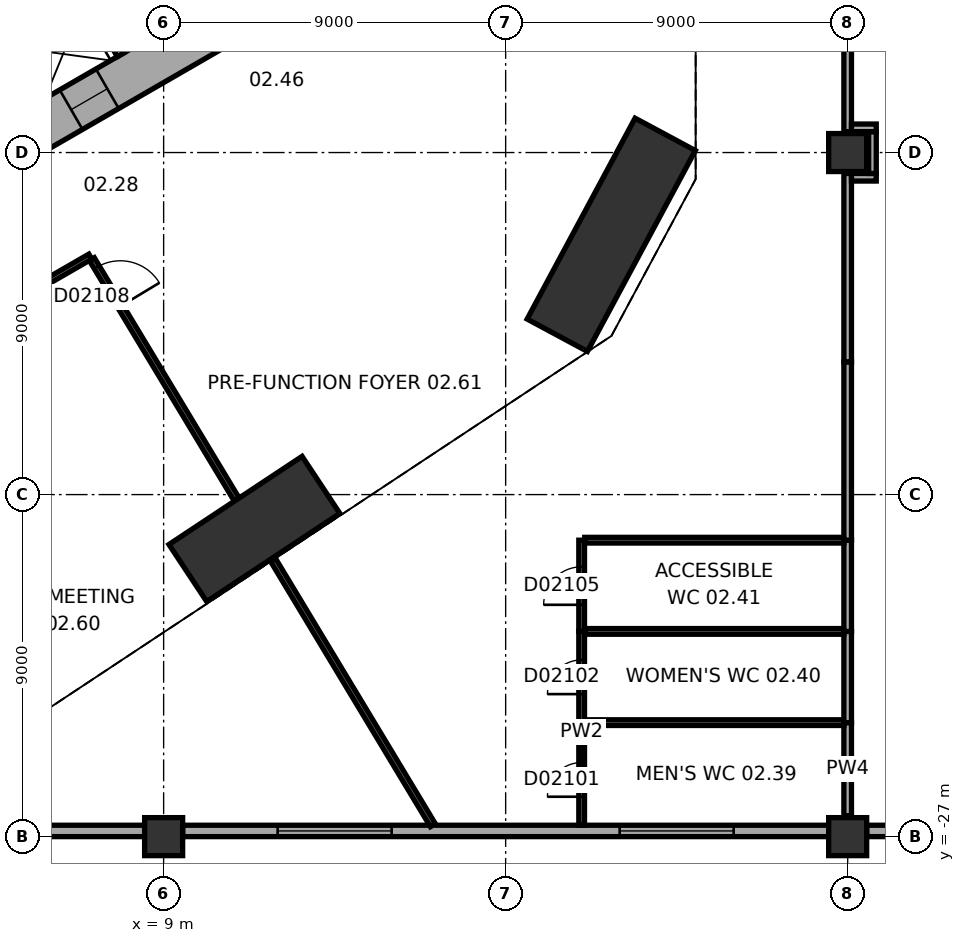
"""IFC4 building model, lengths in metres.
Left out: names, types, materials, properties, quantities, classifications, styles, units other than length and angle.
Written with IfcOpenShell. Run it as: python <this file> out.ifc"""

import sys

from ifc_helpers import new_model, si_unit, direction, frame, frame_2d, origin, origin_2d, place, context, subcontext, project, spatial, rectangle, extrude, element, fill, save


model = new_model("IFC4")
c1 = context("Model", 3, precision=1e-05, world=origin(), true_north=direction((0.0, 1.0)))
c2 = subcontext(c1, "Body", "Model", "MODEL_VIEW")
j1 = project(units=[si_unit("LENGTHUNIT", "METRE"), si_unit("PLANEANGLEUNIT", "RADIAN")], contexts=[c1])
p1 = place(None, origin())
s1 = spatial("IfcSite", under=j1, at=p1, CompositionType="ELEMENT")
p2 = place(p1, origin())
s2 = spatial("IfcBuilding", under=s1, at=p2, CompositionType="ELEMENT")
p3 = place(p2, frame((0.0, 0.0, 13.0)))
s3 = spatial("IfcBuildingStorey", under=s2, at=p3, CompositionType="ELEMENT", Elevation=13.0)
p4 = place(p3, frame((11.389, -18.905, 0.0), z_axis=(0.0, 0.0, 1.0), x_axis=(0.833880042151, 0.551945717714, 0.0)))
e1 = element("IfcColumn", 1, at=p4, inside=s3, PredefinedType="COLUMN", context=c2, shape_type="SweptSolid", body=[
    extrude(rectangle(XDim=4.2, YDim=1.8, at=origin_2d()), origin(), (0.0, 0.0, 1.0), 8.0),
])
p5 = place(p3, frame((20.779, -11.165, 0.0), z_axis=(0.0, 0.0, 1.0), x_axis=(0.473322742071, 0.880889086003, 0.0)))
e2 = element("IfcColumn", 2, at=p5, inside=s3, PredefinedType="COLUMN", context=c2, shape_type="SweptSolid", body=[
    extrude(rectangle(XDim=6.0, YDim=1.8, at=origin_2d()), origin(), (0.0, 0.0, 1.0), 8.0),
])
for number, where, z_axis, x_axis in (
    (3, (9.0, -27.0, 0.0), (0.0, 0.0, 1.0), (1.0, 0.0, 0.0)),
    (4, (27.0, -27.0, 0.0), (0.0, 0.0, 1.0), (1.0, 0.0, 0.0)),
    (5, (27.0, -9.0, 0.0), (0.0, 0.0, 1.0), (1.0, 0.0, 0.0)),
):
    element("IfcColumn", number, at=place(p3, frame(where, z_axis=z_axis, x_axis=x_axis)), inside=s3, PredefinedType="COLUMN", context=c2, shape_type="SweptSolid", body=[
        extrude(rectangle(XDim=1.0, YDim=1.0, at=origin_2d()), origin(), (0.0, 0.0, 1.0), 8.0),
    ])
p6 = place(p3, frame((-0.3, -11.836, 0.0), z_axis=(0.0, 0.0, 1.0), x_axis=(0.866021384402, 0.500006961711, 0.0)))
e6 = element("IfcWall", 6, at=p6, inside=s3, PredefinedType="SHEAR", context=c2, shape_type="SweptSolid", body=[
    extrude(rectangle(XDim=12.355, YDim=1.2, at=frame_2d((6.178, 0.0))), origin(), (0.0, 0.0, 1.0), 8.0),
])
p7 = place(p6, frame((4.128, 0.0, 0.0)))
e7 = element("IfcOpeningElement", 7, at=p7, cuts=e6, PredefinedType="OPENING", context=c2, shape_type="SweptSolid", body=[
    extrude(rectangle(XDim=0.9, YDim=2.1, at=frame_2d((0.45, 1.05))), frame((0.0, 0.61, 0.0), z_axis=(0.0, -1.0, 0.0), x_axis=(1.0, 0.0, 0.0)), (0.0, 0.0, 1.0), 1.22),
])
p8 = place(p6, frame((7.928, 0.0, 0.0)))
e8 = element("IfcOpeningElement", 8, at=p8, cuts=e6, PredefinedType="OPENING", context=c2, shape_type="SweptSolid", body=[
    extrude(rectangle(XDim=1.1, YDim=2.1, at=frame_2d((0.55, 1.05))), frame((0.0, 0.61, 0.0), z_axis=(0.0, -1.0, 0.0), x_axis=(1.0, 0.0, 0.0)), (0.0, 0.0, 1.0), 1.22),
])
p9 = place(p3, frame((-8.5, -26.85, 0.0), z_axis=(0.0, 0.0, 1.0), x_axis=(1.0, 0.0, 0.0)))
e9 = element("IfcWall", 9, at=p9, inside=s3, PredefinedType="STANDARD", context=c2, shape_type="SweptSolid", body=[
    extrude(rectangle(XDim=17.0, YDim=0.3, at=frame_2d((8.5, 0.0))), origin(), (0.0, 0.0, 1.0), 6.5),
])
p10 = place(p9, frame((2.5, 0.0, 1.0)))
e10 = element("IfcOpeningElement", 10, at=p10, cuts=e9, PredefinedType="OPENING", context=c2, shape_type="SweptSolid", body=[
    extrude(rectangle(XDim=3.0, YDim=4.0, at=frame_2d((1.5, 2.0))), frame((0.0, 0.16, 0.0), z_axis=(0.0, -1.0, 0.0), x_axis=(1.0, 0.0, 0.0)), (0.0, 0.0, 1.0), 0.32),
])
p11 = place(p9, frame((11.5, 0.0, 1.0)))
e11 = element("IfcOpeningElement", 11, at=p11, cuts=e9, PredefinedType="OPENING", context=c2, shape_type="SweptSolid", body=[
    extrude(rectangle(XDim=3.0, YDim=4.0, at=frame_2d((1.5, 2.0))), frame((0.0, 0.16, 0.0), z_axis=(0.0, -1.0, 0.0), x_axis=(1.0, 0.0, 0.0)), (0.0, 0.0, 1.0), 0.32),
])
p12 = place(p3, frame((9.5, -26.85, 0.0), z_axis=(0.0, 0.0, 1.0), x_axis=(1.0, 0.0, 0.0)))
e12 = element("IfcWall", 12, at=p12, inside=s3, PredefinedType="STANDARD", context=c2, shape_type="SweptSolid", body=[
    extrude(rectangle(XDim=17.0, YDim=0.3, at=frame_2d((8.5, 0.0))), origin(), (0.0, 0.0, 1.0), 6.5),
])
p13 = place(p12, frame((2.5, 0.0, 1.0)))
e13 = element("IfcOpeningElement", 13, at=p13, cuts=e12, PredefinedType="OPENING", context=c2, shape_type="SweptSolid", body=[
    extrude(rectangle(XDim=3.0, YDim=4.0, at=frame_2d((1.5, 2.0))), frame((0.0, 0.16, 0.0), z_axis=(0.0, -1.0, 0.0), x_axis=(1.0, 0.0, 0.0)), (0.0, 0.0, 1.0), 0.32),
])
p14 = place(p12, frame((11.5, 0.0, 1.0)))
e14 = element("IfcOpeningElement", 14, at=p14, cuts=e12, PredefinedType="OPENING", context=c2, shape_type="SweptSolid", body=[
    extrude(rectangle(XDim=3.0, YDim=4.0, at=frame_2d((1.5, 2.0))), frame((0.0, 0.16, 0.0), z_axis=(0.0, -1.0, 0.0), x_axis=(1.0, 0.0, 0.0)), (0.0, 0.0, 1.0), 0.32),
])
p15 = place(p3, frame((27.5, -26.85, 0.0), z_axis=(0.0, 0.0, 1.0), x_axis=(1.0, 0.0, 0.0)))
e15 = element("IfcWall", 15, at=p15, inside=s3, PredefinedType="STANDARD", context=c2, shape_type="SweptSolid", body=[
    extrude(rectangle(XDim=17.0, YDim=0.3, at=frame_2d((8.5, 0.0))), origin(), (0.0, 0.0, 1.0), 6.5),
])
p16 = place(p15, frame((2.5, 0.0, 1.0)))
e16 = element("IfcOpeningElement", 16, at=p16, cuts=e15, PredefinedType="OPENING", context=c2, shape_type="SweptSolid", body=[
    extrude(rectangle(XDim=3.0, YDim=4.0, at=frame_2d((1.5, 2.0))), frame((0.0, 0.16, 0.0), z_axis=(0.0, -1.0, 0.0), x_axis=(1.0, 0.0, 0.0)), (0.0, 0.0, 1.0), 0.32),
])
p17 = place(p15, frame((11.5, 0.0, 1.0)))
e17 = element("IfcOpeningElement", 17, at=p17, cuts=e15, PredefinedType="OPENING", context=c2, shape_type="SweptSolid", body=[
    extrude(rectangle(XDim=3.0, YDim=4.0, at=frame_2d((1.5, 2.0))), frame((0.0, 0.16, 0.0), z_axis=(0.0, -1.0, 0.0), x_axis=(1.0, 0.0, 0.0)), (0.0, 0.0, 1.0), 0.32),
])
p18 = place(p3, frame((-0.024, -8.559, 0.0), z_axis=(0.0, 0.0, 1.0), x_axis=(0.866026010844, 0.49999894854, 0.0)))
e18 = element("IfcWall", 18, at=p18, inside=s3, PredefinedType="PARTITIONING", context=c2, shape_type="SweptSolid", body=[
    extrude(rectangle(XDim=8.0, YDim=0.2, at=frame_2d((4.0, 0.0))), origin(), (0.0, 0.0, 1.0), 7.7),
])
p19 = place(p3, frame((6.768, -4.522, 0.0), z_axis=(0.0, 0.0, 1.0), x_axis=(0.50002983664, -0.866008176907, 0.0)))
e19 = element("IfcWall", 19, at=p19, inside=s3, PredefinedType="PARTITIONING", context=c2, shape_type="SweptSolid", body=[
    extrude(rectangle(XDim=2.2, YDim=0.2, at=frame_2d((1.1, 0.0))), origin(), (0.0, 0.0, 1.0), 7.7),
])
p20 = place(p3, frame((0.847, -7.767, 0.0), z_axis=(0.0, 0.0, 1.0), x_axis=(0.866027801685, 0.499995846692, 0.0)))
e20 = element("IfcWall", 20, at=p20, inside=s3, PredefinedType="SHEAR", context=c2, shape_type="SweptSolid", body=[
    extrude(rectangle(XDim=7.06, YDim=0.3, at=frame_2d((3.53, 0.0))), origin(), (0.0, 0.0, 1.0), 7.7),
])
p21 = place(p3, frame((20.0, -26.7, 0.0), z_axis=(0.0, 0.0, 1.0), x_axis=(0.0, 1.0, 0.0)))
e21 = element("IfcWall", 21, at=p21, inside=s3, PredefinedType="PARTITIONING", context=c2, shape_type="SweptSolid", body=[
    extrude(rectangle(XDim=2.7, YDim=0.15, at=frame_2d((1.35, 0.0))), origin(), (0.0, 0.0, 1.0), 7.7),
])
p22 = place(p21, frame((0.75, 0.0, 0.0)))
e22 = element("IfcOpeningElement", 22, at=p22, cuts=e21, PredefinedType="OPENING", context=c2, shape_type="SweptSolid", body=[
    extrude(rectangle(XDim=0.9, YDim=2.1, at=frame_2d((0.45, 1.05))), frame((0.0, 0.085, 0.0), z_axis=(0.0, -1.0, 0.0), x_axis=(1.0, 0.0, 0.0)), (0.0, 0.0, 1.0), 0.17),
])
p23 = place(p3, frame((27.0, -26.45, 0.0), z_axis=(0.0, 0.0, 1.0), x_axis=(0.0, 1.0, 0.0)))
e23 = element("IfcWall", 23, at=p23, inside=s3, PredefinedType="PARTITIONING", context=c2, shape_type="SweptSolid", body=[
    extrude(rectangle(XDim=2.45, YDim=0.2, at=frame_2d((1.225, 0.0))), origin(), (0.0, 0.0, 1.0), 6.5),
])
p24 = place(p3, frame((20.0, -24.0, 0.0), z_axis=(0.0, 0.0, 1.0), x_axis=(0.0, 1.0, 0.0)))
e24 = element("IfcWall", 24, at=p24, inside=s3, PredefinedType="PARTITIONING", context=c2, shape_type="SweptSolid", body=[
    extrude(rectangle(XDim=2.4, YDim=0.15, at=frame_2d((1.2, 0.0))), origin(), (0.0, 0.0, 1.0), 7.7),
])
p25 = place(p24, frame((0.75, 0.0, 0.0)))
e25 = element("IfcOpeningElement", 25, at=p25, cuts=e24, PredefinedType="OPENING", context=c2, shape_type="SweptSolid", body=[
    extrude(rectangle(XDim=0.9, YDim=2.1, at=frame_2d((0.45, 1.05))), frame((0.0, 0.085, 0.0), z_axis=(0.0, -1.0, 0.0), x_axis=(1.0, 0.0, 0.0)), (0.0, 0.0, 1.0), 0.17),
])
p26 = place(p3, frame((20.08, -24.0, 0.0), z_axis=(0.0, 0.0, 1.0), x_axis=(1.0, 0.0, 0.0)))
e26 = element("IfcWall", 26, at=p26, inside=s3, PredefinedType="PARTITIONING", context=c2, shape_type="SweptSolid", body=[
    extrude(rectangle(XDim=6.82, YDim=0.15, at=frame_2d((3.41, 0.0))), origin(), (0.0, 0.0, 1.0), 7.7),
])
p27 = place(p3, frame((27.0, -24.0, 0.0), z_axis=(0.0, 0.0, 1.0), x_axis=(0.0, 1.0, 0.0)))
e27 = element("IfcWall", 27, at=p27, inside=s3, PredefinedType="PARTITIONING", context=c2, shape_type="SweptSolid", body=[
    extrude(rectangle(XDim=2.4, YDim=0.2, at=frame_2d((1.2, 0.0))), origin(), (0.0, 0.0, 1.0), 6.5),
])
p28 = place(p3, frame((20.0, -21.6, 0.0), z_axis=(0.0, 0.0, 1.0), x_axis=(0.0, 1.0, 0.0)))
e28 = element("IfcWall", 28, at=p28, inside=s3, PredefinedType="PARTITIONING", context=c2, shape_type="SweptSolid", body=[
    extrude(rectangle(XDim=2.4, YDim=0.15, at=frame_2d((1.2, 0.0))), origin(), (0.0, 0.0, 1.0), 7.7),
])
p29 = place(p28, frame((0.7, 0.0, 0.0)))
e29 = element("IfcOpeningElement", 29, at=p29, cuts=e28, PredefinedType="OPENING", context=c2, shape_type="SweptSolid", body=[
    extrude(rectangle(XDim=1.0, YDim=2.1, at=frame_2d((0.5, 1.05))), frame((0.0, 0.085, 0.0), z_axis=(0.0, -1.0, 0.0), x_axis=(1.0, 0.0, 0.0)), (0.0, 0.0, 1.0), 0.17),
])
p30 = place(p3, frame((20.08, -21.6, 0.0), z_axis=(0.0, 0.0, 1.0), x_axis=(1.0, 0.0, 0.0)))
e30 = element("IfcWall", 30, at=p30, inside=s3, PredefinedType="PARTITIONING", context=c2, shape_type="SweptSolid", body=[
    extrude(rectangle(XDim=6.82, YDim=0.15, at=frame_2d((3.41, 0.0))), origin(), (0.0, 0.0, 1.0), 7.7),
])
p31 = place(p3, frame((27.0, -21.6, 0.0), z_axis=(0.0, 0.0, 1.0), x_axis=(0.0, 1.0, 0.0)))
e31 = element("IfcWall", 31, at=p31, inside=s3, PredefinedType="PARTITIONING", context=c2, shape_type="SweptSolid", body=[
    extrude(rectangle(XDim=2.4, YDim=0.2, at=frame_2d((1.2, 0.0))), origin(), (0.0, 0.0, 1.0), 6.5),
])
p32 = place(p3, frame((11.879, -19.719, 0.0), z_axis=(0.0, 0.0, 1.0), x_axis=(0.516054476578, -0.856555764212, 0.0)))
e32 = element("IfcWall", 32, at=p32, inside=s3, PredefinedType="PARTITIONING", context=c2, shape_type="SweptSolid", body=[
    extrude(rectangle(XDim=8.149, YDim=0.15, at=frame_2d((4.075, 0.0))), origin(), (0.0, 0.0, 1.0), 7.7),
])
p33 = place(p3, frame((20.08, -19.2, 0.0), z_axis=(0.0, 0.0, 1.0), x_axis=(1.0, 0.0, 0.0)))
e33 = element("IfcWall", 33, at=p33, inside=s3, PredefinedType="PARTITIONING", context=c2, shape_type="SweptSolid", body=[
    extrude(rectangle(XDim=6.82, YDim=0.15, at=frame_2d((3.41, 0.0))), origin(), (0.0, 0.0, 1.0), 7.7),
])
p34 = place(p3, frame((27.0, -19.2, 0.0), z_axis=(0.0, 0.0, 1.0), x_axis=(0.0, 1.0, 0.0)))
e34 = element("IfcWall", 34, at=p34, inside=s3, PredefinedType="PARTITIONING", context=c2, shape_type="SweptSolid", body=[
    extrude(rectangle(XDim=4.692, YDim=0.2, at=frame_2d((2.346, 0.0))), origin(), (0.0, 0.0, 1.0), 6.5),
])
p35 = place(p3, frame((10.924, -18.133, 0.0), z_axis=(0.0, 0.0, 1.0), x_axis=(-0.516035715917, 0.856567066784, 0.0)))
e35 = element("IfcWall", 35, at=p35, inside=s3, PredefinedType="PARTITIONING", context=c2, shape_type="SweptSolid", body=[
    extrude(rectangle(XDim=7.387, YDim=0.15, at=frame_2d((3.693, 0.0))), origin(), (0.0, 0.0, 1.0), 7.7),
])
p36 = place(p35, frame((5.937, 0.0, 0.0)))
e36 = element("IfcOpeningElement", 36, at=p36, cuts=e35, PredefinedType="OPENING", context=c2, shape_type="SweptSolid", body=[
    extrude(rectangle(XDim=1.2, YDim=2.1, at=frame_2d((0.6, 1.05))), frame((0.0, 0.085, 0.0), z_axis=(0.0, -1.0, 0.0), x_axis=(1.0, 0.0, 0.0)), (0.0, 0.0, 1.0), 0.17),
])
p37 = place(p3, frame((0.475, -15.545, 0.0), z_axis=(0.0, 0.0, 1.0), x_axis=(0.866021168401, 0.500007335828, 0.0)))
e37 = element("IfcWall", 37, at=p37, inside=s3, PredefinedType="PARTITIONING", context=c2, shape_type="SweptSolid", body=[
    extrude(rectangle(XDim=7.616, YDim=0.15, at=frame_2d((3.808, 0.0))), origin(), (0.0, 0.0, 1.0), 7.7),
])
p38 = place(p3, frame((27.0, -14.508, 0.0), z_axis=(0.0, 0.0, 1.0), x_axis=(0.0, 1.0, 0.0)))
e38 = element("IfcWall", 38, at=p38, inside=s3, PredefinedType="PARTITIONING", context=c2, shape_type="SweptSolid", body=[
    extrude(rectangle(XDim=4.958, YDim=0.2, at=frame_2d((2.479, 0.0))), origin(), (0.0, 0.0, 1.0), 6.5),
])
p39 = place(p3, frame((27.1, -9.65, 0.0), z_axis=(0.0, 0.0, 1.0), x_axis=(1.0, 0.0, 0.0)))
e39 = element("IfcWall", 39, at=p39, inside=s3, PredefinedType="PARTITIONING", context=c2, shape_type="SweptSolid", body=[
    extrude(rectangle(XDim=0.652, YDim=0.2, at=frame_2d((0.326, 0.0))), origin(), (0.0, 0.0, 1.0), 7.7),
])
p40 = place(p3, frame((27.652, -9.55, 0.0), z_axis=(0.0, 0.0, 1.0), x_axis=(0.0, 1.0, 0.0)))
e40 = element("IfcWall", 40, at=p40, inside=s3, PredefinedType="PARTITIONING", context=c2, shape_type="SweptSolid", body=[
    extrude(rectangle(XDim=1.1, YDim=0.2, at=frame_2d((0.55, 0.0))), origin(), (0.0, 0.0, 1.0), 7.7),
])
p41 = place(p3, frame((27.0, -8.45, 0.0), z_axis=(0.0, 0.0, 1.0), x_axis=(0.0, 1.0, 0.0)))
e41 = element("IfcWall", 41, at=p41, inside=s3, PredefinedType="PARTITIONING", context=c2, shape_type="SweptSolid", body=[
    extrude(rectangle(XDim=3.05, YDim=0.2, at=frame_2d((1.525, 0.0))), origin(), (0.0, 0.0, 1.0), 6.5),
])
p42 = place(p3, frame((27.1, -8.35, 0.0), z_axis=(0.0, 0.0, 1.0), x_axis=(1.0, 0.0, 0.0)))
e42 = element("IfcWall", 42, at=p42, inside=s3, PredefinedType="PARTITIONING", context=c2, shape_type="SweptSolid", body=[
    extrude(rectangle(XDim=0.652, YDim=0.2, at=frame_2d((0.326, 0.0))), origin(), (0.0, 0.0, 1.0), 7.7),
])
p43 = place(p13, origin())
e43 = element("IfcWindow", 43, at=p43, inside=s3, PartitioningType="SINGLE_PANEL", PredefinedType="WINDOW", context=c2, shape_type="SweptSolid", body=[
    extrude(rectangle(XDim=3.0, YDim=4.0, at=frame_2d((1.5, 2.0))), frame((0.0, 0.03, 0.0), z_axis=(0.0, -1.0, 0.0), x_axis=(1.0, 0.0, 0.0)), (0.0, 0.0, 1.0), 0.06),
])
fill(e13, e43)
p44 = place(p14, origin())
e44 = element("IfcWindow", 44, at=p44, inside=s3, PartitioningType="SINGLE_PANEL", PredefinedType="WINDOW", context=c2, shape_type="SweptSolid", body=[
    extrude(rectangle(XDim=3.0, YDim=4.0, at=frame_2d((1.5, 2.0))), frame((0.0, 0.03, 0.0), z_axis=(0.0, -1.0, 0.0), x_axis=(1.0, 0.0, 0.0)), (0.0, 0.0, 1.0), 0.06),
])
fill(e14, e44)
p45 = place(p8, origin())
e45 = element("IfcDoor", 45, at=p45, inside=s3, OperationType="DOUBLE_DOOR_SLIDING", PredefinedType="DOOR", context=c2, shape_type="SweptSolid", body=[
    extrude(rectangle(XDim=1.1, YDim=2.1, at=frame_2d((0.55, 1.05))), frame((0.0, 0.025, 0.0), z_axis=(0.0, -1.0, 0.0), x_axis=(1.0, 0.0, 0.0)), (0.0, 0.0, 1.0), 0.05),
])
fill(e8, e45)
p46 = place(p22, origin())
e46 = element("IfcDoor", 46, at=p46, inside=s3, OperationType="SINGLE_SWING_LEFT", PredefinedType="DOOR", context=c2, shape_type="SweptSolid", body=[
    extrude(rectangle(XDim=0.9, YDim=2.1, at=frame_2d((0.45, 1.05))), frame((0.0, 0.025, 0.0), z_axis=(0.0, -1.0, 0.0), x_axis=(1.0, 0.0, 0.0)), (0.0, 0.0, 1.0), 0.05),
])
fill(e22, e46)
p47 = place(p25, origin())
e47 = element("IfcDoor", 47, at=p47, inside=s3, OperationType="SINGLE_SWING_LEFT", PredefinedType="DOOR", context=c2, shape_type="SweptSolid", body=[
    extrude(rectangle(XDim=0.9, YDim=2.1, at=frame_2d((0.45, 1.05))), frame((0.0, 0.025, 0.0), z_axis=(0.0, -1.0, 0.0), x_axis=(1.0, 0.0, 0.0)), (0.0, 0.0, 1.0), 0.05),
])
fill(e25, e47)
p48 = place(p29, origin())
e48 = element("IfcDoor", 48, at=p48, inside=s3, OperationType="SINGLE_SWING_LEFT", PredefinedType="DOOR", context=c2, shape_type="SweptSolid", body=[
    extrude(rectangle(XDim=1.0, YDim=2.1, at=frame_2d((0.5, 1.05))), frame((0.0, 0.025, 0.0), z_axis=(0.0, -1.0, 0.0), x_axis=(1.0, 0.0, 0.0)), (0.0, 0.0, 1.0), 0.05),
])
fill(e29, e48)
p49 = place(p36, origin())
e49 = element("IfcDoor", 49, at=p49, inside=s3, OperationType="SINGLE_SWING_LEFT", PredefinedType="DOOR", context=c2, shape_type="SweptSolid", body=[
    extrude(rectangle(XDim=1.2, YDim=2.1, at=frame_2d((0.6, 1.05))), frame((0.0, 0.025, 0.0), z_axis=(0.0, -1.0, 0.0), x_axis=(1.0, 0.0, 0.0)), (0.0, 0.0, 1.0), 0.05),
])
fill(e36, e49)
save(model, sys.argv[1])
